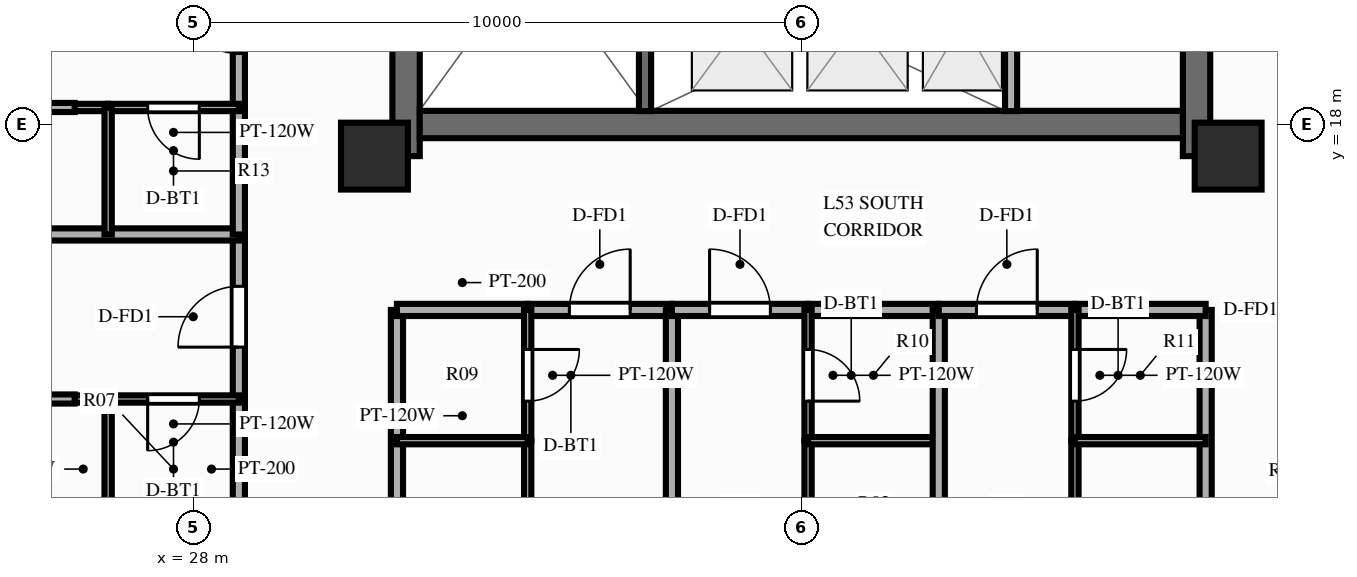
"""IFC4 building model, lengths in metres.
Left out: names, types, materials, properties, quantities, classifications, styles, units other than length and angle.
Written with IfcOpenShell. Run it as: python <this file> out.ifc"""

import sys

from ifc_helpers import new_model, si_unit, direction, frame, frame_2d, origin, origin_2d, place, context, subcontext, project, spatial, rectangle, extrude, source, transform, mapped, element, fill, save


model = new_model("IFC4")
c1 = context("Model", 3, precision=1e-05, world=origin(), true_north=direction((0.0, 1.0)))
c2 = subcontext(c1, "Body", "Model", "MODEL_VIEW")
j1 = project(units=[si_unit("LENGTHUNIT", "METRE"), si_unit("PLANEANGLEUNIT", "RADIAN")], contexts=[c1])
p1 = place(None, origin())
s1 = spatial("IfcSite", under=j1, at=p1, CompositionType="ELEMENT")
p2 = place(p1, origin())
s2 = spatial("IfcBuilding", under=s1, at=p2, CompositionType="ELEMENT")
p3 = place(p2, frame((0.0, 0.0, 169.0)))
s3 = spatial("IfcBuildingStorey", under=s2, at=p3, CompositionType="ELEMENT", Elevation=169.0)
p4 = place(p3, frame((31.5, 17.48, 0.0), z_axis=(0.0, 0.0, 1.0), x_axis=(0.0, 1.0, 0.0)))
e1 = element("IfcWall", 1, at=p4, inside=s3, PredefinedType="SHEAR", context=c2, shape_type="SweptSolid", body=[
    extrude(rectangle(XDim=19.04, YDim=0.45, at=frame_2d((9.52, 0.0))), origin(), (0.0, 0.0, 1.0), 3.9),
])
p5 = place(p4, frame((6.32, 0.0, 0.0)))
e2 = element("IfcOpeningElement", 2, at=p5, cuts=e1, PredefinedType="OPENING", context=c2, shape_type="SweptSolid", body=[
    extrude(rectangle(XDim=1.1, YDim=2.15, at=frame_2d((0.55, 1.075))), frame((0.0, 0.237, 0.0), z_axis=(0.0, -1.0, 0.0), x_axis=(1.0, 0.0, 0.0)), (0.0, 0.0, 1.0), 0.474),
])
p6 = place(p3, frame((44.5, 17.48, 0.0), z_axis=(0.0, 0.0, 1.0), x_axis=(0.0, 1.0, 0.0)))
e3 = element("IfcWall", 3, at=p6, inside=s3, PredefinedType="SHEAR", context=c2, shape_type="SweptSolid", body=[
    extrude(rectangle(XDim=19.04, YDim=0.45, at=frame_2d((9.52, 0.0))), origin(), (0.0, 0.0, 1.0), 3.9),
])
p7 = place(p6, frame((12.67, 0.0, 0.0), z_axis=(0.0, 0.0, 1.0), x_axis=(-1.0, 0.0, 0.0)))
e4 = element("IfcOpeningElement", 4, at=p7, cuts=e3, PredefinedType="OPENING", context=c2, shape_type="SweptSolid", body=[
    extrude(rectangle(XDim=1.1, YDim=2.15, at=frame_2d((0.55, 1.075))), frame((0.0, 0.237, 0.0), z_axis=(0.0, -1.0, 0.0), x_axis=(1.0, 0.0, 0.0)), (0.0, 0.0, 1.0), 0.474),
])
p8 = place(p3, frame((31.725, 18.0, 0.0), z_axis=(0.0, 0.0, 1.0), x_axis=(1.0, 0.0, 0.0)))
e5 = element("IfcWall", 5, at=p8, inside=s3, PredefinedType="SHEAR", context=c2, shape_type="SweptSolid", body=[
    extrude(rectangle(XDim=12.55, YDim=0.45, at=frame_2d((6.275, 0.0))), origin(), (0.0, 0.0, 1.0), 3.9),
])
m1 = source(origin(), c2, "Body", "SweptSolid", [
    extrude(rectangle(XDim=1.1, YDim=1.1, at=origin_2d()), origin(), (0.0, 0.0, 1.0), 3.9),
])
for number, where, z_axis, x_axis in (
    (6, (30.98, 17.48, 0.0), (0.0, 0.0, 1.0), (1.0, 0.0, 0.0)),
    (7, (45.02, 17.48, 0.0), (0.0, 0.0, 1.0), (1.0, 0.0, 0.0)),
):
    element("IfcColumn", number, at=place(p3, frame(where, z_axis=z_axis, x_axis=x_axis)), inside=s3, PredefinedType="COLUMN", context=c2, shape_type="MappedRepresentation", body=[
        mapped(m1, transform((0.0, 0.0, 0.0), scale=1.0)),
    ])
p9 = place(p3, frame((41.45, 18.22, 0.0), z_axis=(0.0, 0.0, 1.0), x_axis=(0.0, 1.0, 0.0)))
e8 = element("IfcWall", 8, at=p9, inside=s3, PredefinedType="PARTITIONING", context=c2, shape_type="SweptSolid", body=[
    extrude(rectangle(XDim=2.96, YDim=0.2, at=frame_2d((1.48, 0.0))), origin(), (0.0, 0.0, 1.0), 3.56),
])
p10 = place(p3, frame((35.43, 18.22, 0.0), z_axis=(0.0, 0.0, 1.0), x_axis=(0.0, 1.0, 0.0)))
e9 = element("IfcWall", 9, at=p10, inside=s3, PredefinedType="SOLIDWALL", context=c2, shape_type="SweptSolid", body=[
    extrude(rectangle(XDim=7.22, YDim=0.2, at=frame_2d((3.61, 0.0))), origin(), (0.0, 0.0, 1.0), 3.69),
])
p11 = place(p10, frame((6.68, 0.0, 0.0), z_axis=(0.0, 0.0, 1.0), x_axis=(-1.0, 0.0, 0.0)))
e10 = element("IfcOpeningElement", 10, at=p11, cuts=e9, PredefinedType="OPENING", context=c2, shape_type="SweptSolid", body=[
    extrude(rectangle(XDim=1.1, YDim=2.15, at=frame_2d((0.55, 1.075))), frame((0.0, 0.112, 0.0), z_axis=(0.0, -1.0, 0.0), x_axis=(1.0, 0.0, 0.0)), (0.0, 0.0, 1.0), 0.224),
])
for number, where, z_axis, x_axis in (
    (11, (31.35, 14.95, 0.0), (0.0, 0.0, 1.0), (0.0, -1.0, 0.0)),
    (12, (44.65, 14.95, 0.0), (0.0, 0.0, 1.0), (0.0, -1.0, 0.0)),
):
    element("IfcWall", number, at=place(p3, frame(where, z_axis=z_axis, x_axis=x_axis)), inside=s3, PredefinedType="PARTITIONING", context=c2, shape_type="SweptSolid", body=[
        extrude(rectangle(XDim=8.8, YDim=0.2, at=frame_2d((4.4, 0.0))), origin(), (0.0, 0.0, 1.0), 2.44),
    ])
p12 = place(p3, frame((31.35, 14.95, 0.0), z_axis=(0.0, 0.0, 1.0), x_axis=(1.0, 0.0, 0.0)))
e13 = element("IfcWall", 13, at=p12, inside=s3, PredefinedType="PARTITIONING", context=c2, shape_type="SweptSolid", body=[
    extrude(rectangle(XDim=2.15, YDim=0.2, at=frame_2d((1.075, 0.0))), origin(), (0.0, 0.0, 1.0), 3.56),
])
p13 = place(p3, frame((33.5, 14.95, 0.0), z_axis=(0.0, 0.0, 1.0), x_axis=(1.0, 0.0, 0.0)))
e14 = element("IfcWall", 14, at=p13, inside=s3, PredefinedType="PARTITIONING", context=c2, shape_type="SweptSolid", body=[
    extrude(rectangle(XDim=2.372, YDim=0.2, at=frame_2d((1.186, 0.0))), origin(), (0.0, 0.0, 1.0), 3.56),
])
p14 = place(p13, frame((0.686, 0.0, 0.0)))
e15 = element("IfcOpeningElement", 15, at=p14, cuts=e14, PredefinedType="OPENING", context=c2, shape_type="SweptSolid", body=[
    extrude(rectangle(XDim=1.0, YDim=2.15, at=frame_2d((0.5, 1.075))), frame((0.0, 0.112, 0.0), z_axis=(0.0, -1.0, 0.0), x_axis=(1.0, 0.0, 0.0)), (0.0, 0.0, 1.0), 0.224),
])
p15 = place(p3, frame((33.5, 14.95, 0.0), z_axis=(0.0, 0.0, 1.0), x_axis=(0.0, -1.0, 0.0)))
e16 = element("IfcWall", 16, at=p15, inside=s3, PredefinedType="PARTITIONING", context=c2, shape_type="SweptSolid", body=[
    extrude(rectangle(XDim=2.15, YDim=0.12, at=frame_2d((1.075, 0.0))), origin(), (0.0, 0.0, 1.0), 3.56),
])
p16 = place(p15, frame((0.65, 0.0, 0.0)))
e17 = element("IfcOpeningElement", 17, at=p16, cuts=e16, PredefinedType="OPENING", context=c2, shape_type="SweptSolid", body=[
    extrude(rectangle(XDim=0.85, YDim=2.05, at=frame_2d((0.425, 1.025))), frame((0.0, 0.072, 0.0), z_axis=(0.0, -1.0, 0.0), x_axis=(1.0, 0.0, 0.0)), (0.0, 0.0, 1.0), 0.144),
])
p17 = place(p3, frame((33.5, 12.8, 0.0), z_axis=(0.0, 0.0, 1.0), x_axis=(0.0, -1.0, 0.0)))
e18 = element("IfcWall", 18, at=p17, inside=s3, PredefinedType="PARTITIONING", context=c2, shape_type="SweptSolid", body=[
    extrude(rectangle(XDim=1.03, YDim=0.12, at=frame_2d((0.515, 0.0))), origin(), (0.0, 0.0, 1.0), 3.56),
])
p18 = place(p3, frame((31.35, 12.8, 0.0), z_axis=(0.0, 0.0, 1.0), x_axis=(1.0, 0.0, 0.0)))
e19 = element("IfcWall", 19, at=p18, inside=s3, PredefinedType="PARTITIONING", context=c2, shape_type="SweptSolid", body=[
    extrude(rectangle(XDim=2.15, YDim=0.12, at=frame_2d((1.075, 0.0))), origin(), (0.0, 0.0, 1.0), 3.56),
])
p19 = place(p3, frame((35.872, 14.95, 0.0), z_axis=(0.0, 0.0, 1.0), x_axis=(0.0, -1.0, 0.0)))
e20 = element("IfcWall", 20, at=p19, inside=s3, PredefinedType="PARTITIONING", context=c2, shape_type="SweptSolid", body=[
    extrude(rectangle(XDim=8.8, YDim=0.2, at=frame_2d((4.4, 0.0))), origin(), (0.0, 0.0, 1.0), 3.56),
])
p20 = place(p3, frame((35.872, 14.95, 0.0), z_axis=(0.0, 0.0, 1.0), x_axis=(1.0, 0.0, 0.0)))
e21 = element("IfcWall", 21, at=p20, inside=s3, PredefinedType="PARTITIONING", context=c2, shape_type="SweptSolid", body=[
    extrude(rectangle(XDim=2.239, YDim=0.2, at=frame_2d((1.12, 0.0))), origin(), (0.0, 0.0, 1.0), 3.56),
])
p21 = place(p20, frame((0.619, 0.0, 0.0)))
e22 = element("IfcOpeningElement", 22, at=p21, cuts=e21, PredefinedType="OPENING", context=c2, shape_type="SweptSolid", body=[
    extrude(rectangle(XDim=1.0, YDim=2.15, at=frame_2d((0.5, 1.075))), frame((0.0, 0.112, 0.0), z_axis=(0.0, -1.0, 0.0), x_axis=(1.0, 0.0, 0.0)), (0.0, 0.0, 1.0), 0.224),
])
p22 = place(p3, frame((38.111, 14.95, 0.0), z_axis=(0.0, 0.0, 1.0), x_axis=(1.0, 0.0, 0.0)))
e23 = element("IfcWall", 23, at=p22, inside=s3, PredefinedType="PARTITIONING", context=c2, shape_type="SweptSolid", body=[
    extrude(rectangle(XDim=2.15, YDim=0.2, at=frame_2d((1.075, 0.0))), origin(), (0.0, 0.0, 1.0), 3.56),
])
p23 = place(p3, frame((38.111, 14.95, 0.0), z_axis=(0.0, 0.0, 1.0), x_axis=(0.0, -1.0, 0.0)))
e24 = element("IfcWall", 24, at=p23, inside=s3, PredefinedType="PARTITIONING", context=c2, shape_type="SweptSolid", body=[
    extrude(rectangle(XDim=2.15, YDim=0.12, at=frame_2d((1.075, 0.0))), origin(), (0.0, 0.0, 1.0), 3.56),
])
p24 = place(p23, frame((0.65, 0.0, 0.0)))
e25 = element("IfcOpeningElement", 25, at=p24, cuts=e24, PredefinedType="OPENING", context=c2, shape_type="SweptSolid", body=[
    extrude(rectangle(XDim=0.85, YDim=2.05, at=frame_2d((0.425, 1.025))), frame((0.0, 0.072, 0.0), z_axis=(0.0, -1.0, 0.0), x_axis=(1.0, 0.0, 0.0)), (0.0, 0.0, 1.0), 0.144),
])
p25 = place(p3, frame((38.111, 12.8, 0.0), z_axis=(0.0, 0.0, 1.0), x_axis=(0.0, -1.0, 0.0)))
e26 = element("IfcWall", 26, at=p25, inside=s3, PredefinedType="PARTITIONING", context=c2, shape_type="SweptSolid", body=[
    extrude(rectangle(XDim=1.03, YDim=0.12, at=frame_2d((0.515, 0.0))), origin(), (0.0, 0.0, 1.0), 3.56),
])
p26 = place(p3, frame((38.111, 12.8, 0.0), z_axis=(0.0, 0.0, 1.0), x_axis=(1.0, 0.0, 0.0)))
e27 = element("IfcWall", 27, at=p26, inside=s3, PredefinedType="PARTITIONING", context=c2, shape_type="SweptSolid", body=[
    extrude(rectangle(XDim=2.15, YDim=0.12, at=frame_2d((1.075, 0.0))), origin(), (0.0, 0.0, 1.0), 3.56),
])
p27 = place(p3, frame((40.261, 14.95, 0.0), z_axis=(0.0, 0.0, 1.0), x_axis=(0.0, -1.0, 0.0)))
e28 = element("IfcWall", 28, at=p27, inside=s3, PredefinedType="PARTITIONING", context=c2, shape_type="SweptSolid", body=[
    extrude(rectangle(XDim=8.8, YDim=0.2, at=frame_2d((4.4, 0.0))), origin(), (0.0, 0.0, 1.0), 3.56),
])
p28 = place(p3, frame((40.261, 14.95, 0.0), z_axis=(0.0, 0.0, 1.0), x_axis=(1.0, 0.0, 0.0)))
e29 = element("IfcWall", 29, at=p28, inside=s3, PredefinedType="PARTITIONING", context=c2, shape_type="SweptSolid", body=[
    extrude(rectangle(XDim=2.239, YDim=0.2, at=frame_2d((1.12, 0.0))), origin(), (0.0, 0.0, 1.0), 3.56),
])
p29 = place(p28, frame((0.619, 0.0, 0.0)))
e30 = element("IfcOpeningElement", 30, at=p29, cuts=e29, PredefinedType="OPENING", context=c2, shape_type="SweptSolid", body=[
    extrude(rectangle(XDim=1.0, YDim=2.15, at=frame_2d((0.5, 1.075))), frame((0.0, 0.112, 0.0), z_axis=(0.0, -1.0, 0.0), x_axis=(1.0, 0.0, 0.0)), (0.0, 0.0, 1.0), 0.224),
])
p30 = place(p3, frame((42.5, 14.95, 0.0), z_axis=(0.0, 0.0, 1.0), x_axis=(1.0, 0.0, 0.0)))
e31 = element("IfcWall", 31, at=p30, inside=s3, PredefinedType="PARTITIONING", context=c2, shape_type="SweptSolid", body=[
    extrude(rectangle(XDim=2.15, YDim=0.2, at=frame_2d((1.075, 0.0))), origin(), (0.0, 0.0, 1.0), 3.56),
])
p31 = place(p3, frame((42.5, 14.95, 0.0), z_axis=(0.0, 0.0, 1.0), x_axis=(0.0, -1.0, 0.0)))
e32 = element("IfcWall", 32, at=p31, inside=s3, PredefinedType="PARTITIONING", context=c2, shape_type="SweptSolid", body=[
    extrude(rectangle(XDim=2.15, YDim=0.12, at=frame_2d((1.075, 0.0))), origin(), (0.0, 0.0, 1.0), 3.56),
])
p32 = place(p31, frame((0.65, 0.0, 0.0)))
e33 = element("IfcOpeningElement", 33, at=p32, cuts=e32, PredefinedType="OPENING", context=c2, shape_type="SweptSolid", body=[
    extrude(rectangle(XDim=0.85, YDim=2.05, at=frame_2d((0.425, 1.025))), frame((0.0, 0.072, 0.0), z_axis=(0.0, -1.0, 0.0), x_axis=(1.0, 0.0, 0.0)), (0.0, 0.0, 1.0), 0.144),
])
p33 = place(p3, frame((42.5, 12.8, 0.0), z_axis=(0.0, 0.0, 1.0), x_axis=(0.0, -1.0, 0.0)))
e34 = element("IfcWall", 34, at=p33, inside=s3, PredefinedType="PARTITIONING", context=c2, shape_type="SweptSolid", body=[
    extrude(rectangle(XDim=1.03, YDim=0.12, at=frame_2d((0.515, 0.0))), origin(), (0.0, 0.0, 1.0), 3.56),
])
p34 = place(p3, frame((42.5, 12.8, 0.0), z_axis=(0.0, 0.0, 1.0), x_axis=(1.0, 0.0, 0.0)))
e35 = element("IfcWall", 35, at=p34, inside=s3, PredefinedType="PARTITIONING", context=c2, shape_type="SweptSolid", body=[
    extrude(rectangle(XDim=2.15, YDim=0.12, at=frame_2d((1.075, 0.0))), origin(), (0.0, 0.0, 1.0), 3.56),
])
p35 = place(p3, frame((28.75, 11.18, 0.0), z_axis=(0.0, 0.0, 1.0), x_axis=(0.0, 1.0, 0.0)))
e36 = element("IfcWall", 36, at=p35, inside=s3, PredefinedType="PARTITIONING", context=c2, shape_type="SweptSolid", body=[
    extrude(rectangle(XDim=2.305, YDim=0.2, at=frame_2d((1.153, 0.0))), origin(), (0.0, 0.0, 1.0), 3.56),
])
p36 = place(p3, frame((28.75, 13.485, 0.0), z_axis=(0.0, 0.0, 1.0), x_axis=(0.0, 1.0, 0.0)))
e37 = element("IfcWall", 37, at=p36, inside=s3, PredefinedType="PARTITIONING", context=c2, shape_type="SweptSolid", body=[
    extrude(rectangle(XDim=2.706, YDim=0.2, at=frame_2d((1.353, 0.0))), origin(), (0.0, 0.0, 1.0), 3.56),
])
p37 = place(p36, frame((0.853, 0.0, 0.0)))
e38 = element("IfcOpeningElement", 38, at=p37, cuts=e37, PredefinedType="OPENING", context=c2, shape_type="SweptSolid", body=[
    extrude(rectangle(XDim=1.0, YDim=2.15, at=frame_2d((0.5, 1.075))), frame((0.0, 0.112, 0.0), z_axis=(0.0, -1.0, 0.0), x_axis=(1.0, 0.0, 0.0)), (0.0, 0.0, 1.0), 0.224),
])
p38 = place(p3, frame((28.75, 13.485, 0.0), z_axis=(0.0, 0.0, 1.0), x_axis=(-1.0, 0.0, 0.0)))
e39 = element("IfcWall", 39, at=p38, inside=s3, PredefinedType="PARTITIONING", context=c2, shape_type="SweptSolid", body=[
    extrude(rectangle(XDim=2.15, YDim=0.12, at=frame_2d((1.075, 0.0))), origin(), (0.0, 0.0, 1.0), 3.56),
])
p39 = place(p38, frame((0.65, 0.0, 0.0)))
e40 = element("IfcOpeningElement", 40, at=p39, cuts=e39, PredefinedType="OPENING", context=c2, shape_type="SweptSolid", body=[
    extrude(rectangle(XDim=0.85, YDim=2.05, at=frame_2d((0.425, 1.025))), frame((0.0, 0.072, 0.0), z_axis=(0.0, -1.0, 0.0), x_axis=(1.0, 0.0, 0.0)), (0.0, 0.0, 1.0), 0.144),
])
p40 = place(p3, frame((26.6, 13.485, 0.0), z_axis=(0.0, 0.0, 1.0), x_axis=(-1.0, 0.0, 0.0)))
e41 = element("IfcWall", 41, at=p40, inside=s3, PredefinedType="PARTITIONING", context=c2, shape_type="SweptSolid", body=[
    extrude(rectangle(XDim=0.55, YDim=0.12, at=frame_2d((0.275, 0.0))), origin(), (0.0, 0.0, 1.0), 3.56),
])
p41 = place(p3, frame((26.6, 11.18, 0.0), z_axis=(0.0, 0.0, 1.0), x_axis=(0.0, 1.0, 0.0)))
e42 = element("IfcWall", 42, at=p41, inside=s3, PredefinedType="PARTITIONING", context=c2, shape_type="SweptSolid", body=[
    extrude(rectangle(XDim=2.305, YDim=0.12, at=frame_2d((1.153, 0.0))), origin(), (0.0, 0.0, 1.0), 3.56),
])
p42 = place(p3, frame((26.05, 13.485, 0.0), z_axis=(0.0, 0.0, 1.0), x_axis=(-1.0, 0.0, 0.0)))
e43 = element("IfcWall", 43, at=p42, inside=s3, PredefinedType="PARTITIONING", context=c2, shape_type="SweptSolid", body=[
    extrude(rectangle(XDim=9.9, YDim=0.15, at=frame_2d((4.95, 0.0))), origin(), (0.0, 0.0, 1.0), 3.56),
])
p43 = place(p42, frame((5.742, 0.0, 0.0)))
e44 = element("IfcOpeningElement", 44, at=p43, cuts=e43, PredefinedType="OPENING", context=c2, shape_type="SweptSolid", body=[
    extrude(rectangle(XDim=0.9, YDim=2.1, at=frame_2d((0.45, 1.05))), frame((0.0, 0.087, 0.0), z_axis=(0.0, -1.0, 0.0), x_axis=(1.0, 0.0, 0.0)), (0.0, 0.0, 1.0), 0.174),
])
p44 = place(p3, frame((28.75, 16.192, 0.0), z_axis=(0.0, 0.0, 1.0), x_axis=(-1.0, 0.0, 0.0)))
e45 = element("IfcWall", 45, at=p44, inside=s3, PredefinedType="PARTITIONING", context=c2, shape_type="SweptSolid", body=[
    extrude(rectangle(XDim=12.6, YDim=0.2, at=frame_2d((6.3, 0.0))), origin(), (0.0, 0.0, 1.0), 3.56),
])
p45 = place(p3, frame((28.75, 16.192, 0.0), z_axis=(0.0, 0.0, 1.0), x_axis=(0.0, 1.0, 0.0)))
e46 = element("IfcWall", 46, at=p45, inside=s3, PredefinedType="PARTITIONING", context=c2, shape_type="SweptSolid", body=[
    extrude(rectangle(XDim=2.088, YDim=0.2, at=frame_2d((1.044, 0.0))), origin(), (0.0, 0.0, 1.0), 3.56),
])
p46 = place(p3, frame((28.75, 18.28, 0.0), z_axis=(0.0, 0.0, 1.0), x_axis=(0.0, 1.0, 0.0)))
e47 = element("IfcWall", 47, at=p46, inside=s3, PredefinedType="PARTITIONING", context=c2, shape_type="SweptSolid", body=[
    extrude(rectangle(XDim=2.776, YDim=0.2, at=frame_2d((1.388, 0.0))), origin(), (0.0, 0.0, 1.0), 3.56),
])
p47 = place(p46, frame((0.888, 0.0, 0.0)))
e48 = element("IfcOpeningElement", 48, at=p47, cuts=e47, PredefinedType="OPENING", context=c2, shape_type="SweptSolid", body=[
    extrude(rectangle(XDim=1.0, YDim=2.15, at=frame_2d((0.5, 1.075))), frame((0.0, 0.112, 0.0), z_axis=(0.0, -1.0, 0.0), x_axis=(1.0, 0.0, 0.0)), (0.0, 0.0, 1.0), 0.224),
])
p48 = place(p3, frame((28.75, 18.28, 0.0), z_axis=(0.0, 0.0, 1.0), x_axis=(-1.0, 0.0, 0.0)))
e49 = element("IfcWall", 49, at=p48, inside=s3, PredefinedType="PARTITIONING", context=c2, shape_type="SweptSolid", body=[
    extrude(rectangle(XDim=2.15, YDim=0.12, at=frame_2d((1.075, 0.0))), origin(), (0.0, 0.0, 1.0), 3.56),
])
p49 = place(p48, frame((0.65, 0.0, 0.0)))
e50 = element("IfcOpeningElement", 50, at=p49, cuts=e49, PredefinedType="OPENING", context=c2, shape_type="SweptSolid", body=[
    extrude(rectangle(XDim=0.85, YDim=2.05, at=frame_2d((0.425, 1.025))), frame((0.0, 0.072, 0.0), z_axis=(0.0, -1.0, 0.0), x_axis=(1.0, 0.0, 0.0)), (0.0, 0.0, 1.0), 0.144),
])
p50 = place(p3, frame((26.6, 18.28, 0.0), z_axis=(0.0, 0.0, 1.0), x_axis=(-1.0, 0.0, 0.0)))
e51 = element("IfcWall", 51, at=p50, inside=s3, PredefinedType="PARTITIONING", context=c2, shape_type="SweptSolid", body=[
    extrude(rectangle(XDim=0.55, YDim=0.12, at=frame_2d((0.275, 0.0))), origin(), (0.0, 0.0, 1.0), 3.56),
])
p51 = place(p3, frame((26.6, 16.192, 0.0), z_axis=(0.0, 0.0, 1.0), x_axis=(0.0, 1.0, 0.0)))
e52 = element("IfcWall", 52, at=p51, inside=s3, PredefinedType="PARTITIONING", context=c2, shape_type="SweptSolid", body=[
    extrude(rectangle(XDim=2.088, YDim=0.12, at=frame_2d((1.044, 0.0))), origin(), (0.0, 0.0, 1.0), 3.56),
])
p52 = place(p3, frame((26.05, 18.28, 0.0), z_axis=(0.0, 0.0, 1.0), x_axis=(-1.0, 0.0, 0.0)))
e53 = element("IfcWall", 53, at=p52, inside=s3, PredefinedType="PARTITIONING", context=c2, shape_type="SweptSolid", body=[
    extrude(rectangle(XDim=9.9, YDim=0.15, at=frame_2d((4.95, 0.0))), origin(), (0.0, 0.0, 1.0), 3.56),
])
p53 = place(p52, frame((5.742, 0.0, 0.0)))
e54 = element("IfcOpeningElement", 54, at=p53, cuts=e53, PredefinedType="OPENING", context=c2, shape_type="SweptSolid", body=[
    extrude(rectangle(XDim=0.9, YDim=2.1, at=frame_2d((0.45, 1.05))), frame((0.0, 0.087, 0.0), z_axis=(0.0, -1.0, 0.0), x_axis=(1.0, 0.0, 0.0)), (0.0, 0.0, 1.0), 0.174),
])
m2 = source(origin(), c2, "Body", "SweptSolid", [
    extrude(rectangle(XDim=1.0, YDim=2.15, at=frame_2d((0.5, 1.075))), frame((0.0, 0.025, 0.0), z_axis=(0.0, -1.0, 0.0), x_axis=(1.0, 0.0, 0.0)), (0.0, 0.0, 1.0), 0.05),
])
p54 = place(p14, origin())
e55 = element("IfcDoor", 55, at=p54, inside=s3, OperationType="SINGLE_SWING_RIGHT", PredefinedType="DOOR", context=c2, shape_type="MappedRepresentation", body=[
    mapped(m2, transform((0.0, 0.0, 0.0), scale=1.0)),
])
fill(e15, e55)
m3 = source(origin(), c2, "Body", "SweptSolid", [
    extrude(rectangle(XDim=0.85, YDim=2.05, at=frame_2d((0.425, 1.025))), frame((0.0, 0.025, 0.0), z_axis=(0.0, -1.0, 0.0), x_axis=(1.0, 0.0, 0.0)), (0.0, 0.0, 1.0), 0.05),
])
p55 = place(p16, origin())
e56 = element("IfcDoor", 56, at=p55, inside=s3, OperationType="SINGLE_SWING_LEFT", PredefinedType="DOOR", context=c2, shape_type="MappedRepresentation", body=[
    mapped(m3, transform((0.0, 0.0, 0.0), scale=1.0)),
])
fill(e17, e56)
p56 = place(p21, origin())
e57 = element("IfcDoor", 57, at=p56, inside=s3, OperationType="SINGLE_SWING_LEFT", PredefinedType="DOOR", context=c2, shape_type="MappedRepresentation", body=[
    mapped(m2, transform((0.0, 0.0, 0.0), scale=1.0)),
])
fill(e22, e57)
p57 = place(p24, origin())
e58 = element("IfcDoor", 58, at=p57, inside=s3, OperationType="SINGLE_SWING_RIGHT", PredefinedType="DOOR", context=c2, shape_type="MappedRepresentation", body=[
    mapped(m3, transform((0.0, 0.0, 0.0), scale=1.0)),
])
fill(e25, e58)
p58 = place(p29, origin())
e59 = element("IfcDoor", 59, at=p58, inside=s3, OperationType="SINGLE_SWING_RIGHT", PredefinedType="DOOR", context=c2, shape_type="MappedRepresentation", body=[
    mapped(m2, transform((0.0, 0.0, 0.0), scale=1.0)),
])
fill(e30, e59)
p59 = place(p32, origin())
e60 = element("IfcDoor", 60, at=p59, inside=s3, OperationType="SINGLE_SWING_LEFT", PredefinedType="DOOR", context=c2, shape_type="MappedRepresentation", body=[
    mapped(m3, transform((0.0, 0.0, 0.0), scale=1.0)),
])
fill(e33, e60)
p60 = place(p37, origin())
e61 = element("IfcDoor", 61, at=p60, inside=s3, OperationType="SINGLE_SWING_LEFT", PredefinedType="DOOR", context=c2, shape_type="MappedRepresentation", body=[
    mapped(m2, transform((0.0, 0.0, 0.0), scale=1.0)),
])
fill(e38, e61)
p61 = place(p39, origin())
e62 = element("IfcDoor", 62, at=p61, inside=s3, OperationType="SINGLE_SWING_RIGHT", PredefinedType="DOOR", context=c2, shape_type="MappedRepresentation", body=[
    mapped(m3, transform((0.0, 0.0, 0.0), scale=1.0)),
])
fill(e40, e62)
p62 = place(p47, origin())
e63 = element("IfcDoor", 63, at=p62, inside=s3, OperationType="SINGLE_SWING_RIGHT", PredefinedType="DOOR", context=c2, shape_type="MappedRepresentation", body=[
    mapped(m2, transform((0.0, 0.0, 0.0), scale=1.0)),
])
fill(e48, e63)
p63 = place(p49, origin())
e64 = element("IfcDoor", 64, at=p63, inside=s3, OperationType="SINGLE_SWING_LEFT", PredefinedType="DOOR", context=c2, shape_type="MappedRepresentation", body=[
    mapped(m3, transform((0.0, 0.0, 0.0), scale=1.0)),
])
fill(e50, e64)
save(model, sys.argv[1])
